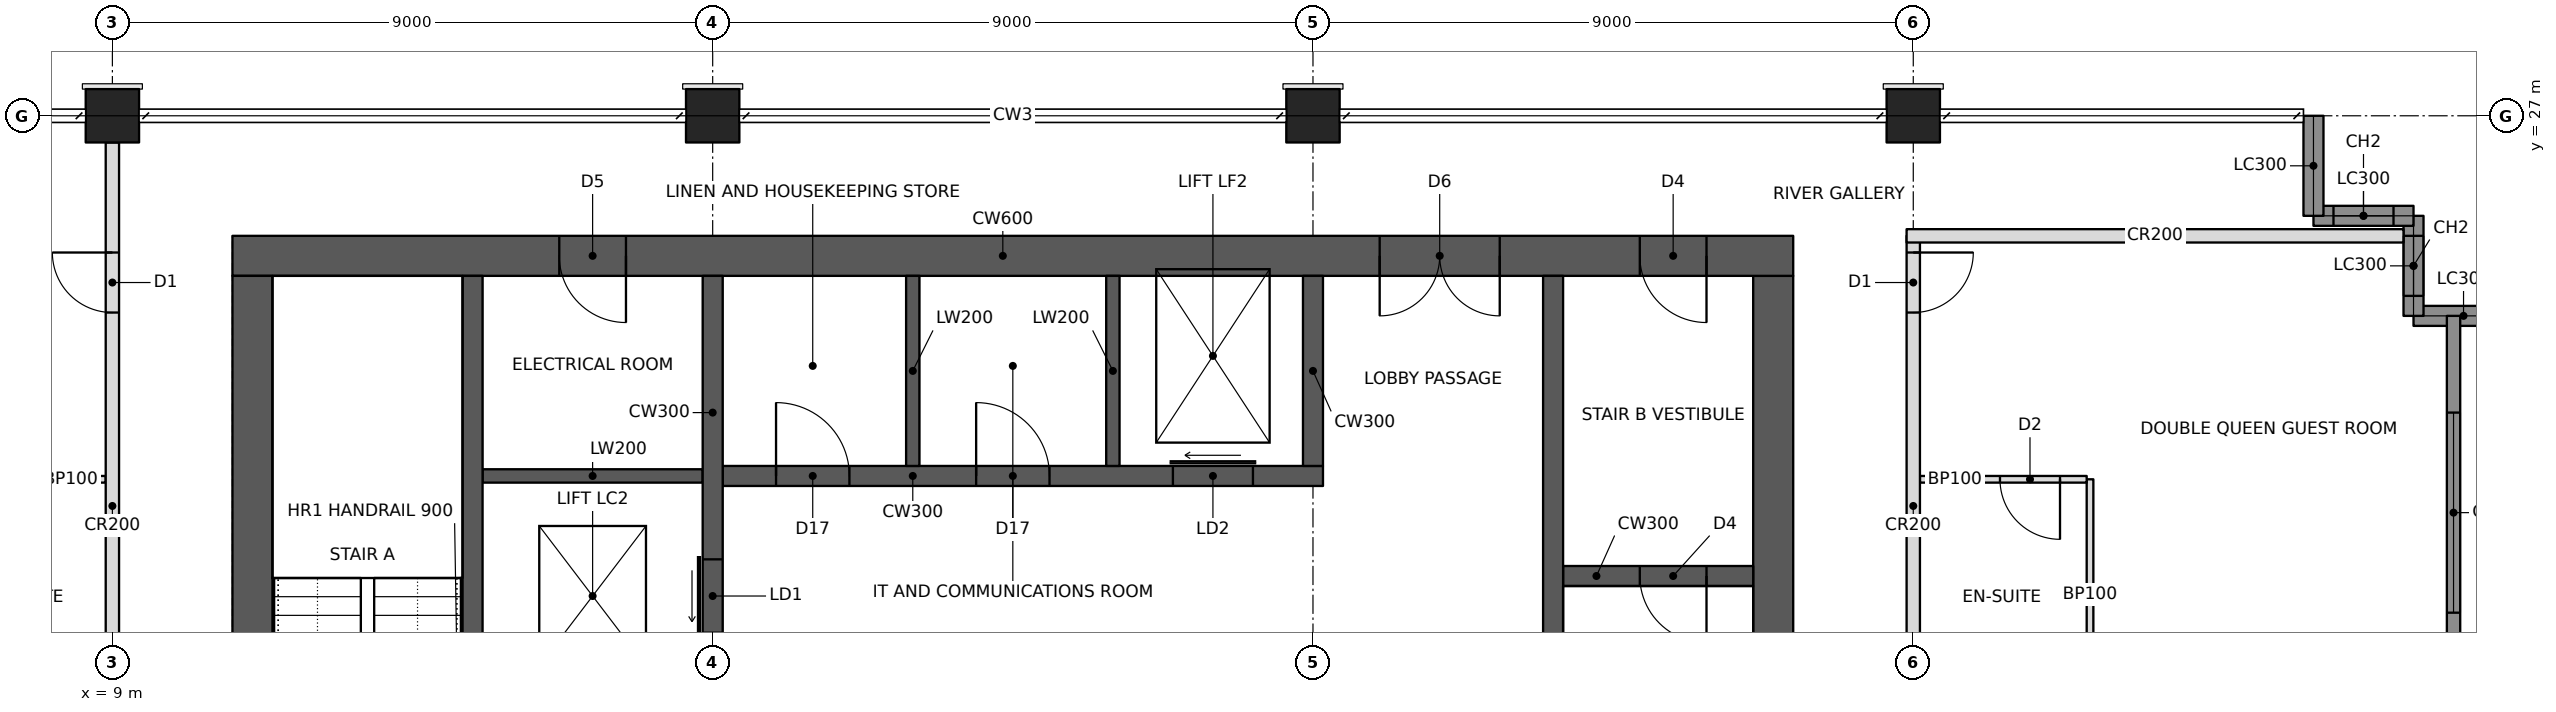
"""IFC4 building model, lengths in metres.
Left out: names, types, materials, properties, quantities, classifications, styles, units other than length and angle.
Written with IfcOpenShell. Run it as: python <this file> out.ifc"""

import sys

from ifc_helpers import new_model, si_unit, direction, frame, frame_2d, origin, origin_2d, place, context, subcontext, project, spatial, rectangle, hollow_rectangle, extrude, element, fill, save


model = new_model("IFC4")
c1 = context("Model", 3, precision=1e-05, world=origin(), true_north=direction((0.0, 1.0)))
c2 = subcontext(c1, "Body", "Model", "MODEL_VIEW")
j1 = project(units=[si_unit("LENGTHUNIT", "METRE"), si_unit("PLANEANGLEUNIT", "RADIAN")], contexts=[c1])
p1 = place(None, origin())
s1 = spatial("IfcSite", under=j1, at=p1, CompositionType="ELEMENT")
p2 = place(p1, origin())
s2 = spatial("IfcBuilding", under=s1, at=p2, CompositionType="ELEMENT")
p3 = place(p2, frame((0.0, 0.0, 167.2)))
s3 = spatial("IfcBuildingStorey", under=s2, at=p3, CompositionType="ELEMENT", Elevation=167.2)
for number, where, z_axis, x_axis in (
    (1, (9.0, 27.0, 0.0), (0.0, 0.0, 1.0), (1.0, 0.0, 0.0)),
    (2, (18.0, 27.0, 0.0), (0.0, 0.0, 1.0), (1.0, 0.0, 0.0)),
    (3, (27.0, 27.0, 0.0), (0.0, 0.0, 1.0), (1.0, 0.0, 0.0)),
    (4, (36.0, 27.0, 0.0), (0.0, 0.0, 1.0), (1.0, 0.0, 0.0)),
):
    element("IfcColumn", number, at=place(p3, frame(where, z_axis=z_axis, x_axis=x_axis)), inside=s3, PredefinedType="COLUMN", context=c2, shape_type="SweptSolid", body=[
        extrude(hollow_rectangle(XDim=0.8, YDim=0.8, WallThickness=0.07, at=origin_2d()), origin(), (0.0, 0.0, 1.0), 3.4),
    ])
p4 = place(p3, frame((10.8, 24.9, 0.0), z_axis=(0.0, 0.0, 1.0), x_axis=(1.0, 0.0, 0.0)))
e5 = element("IfcWall", 5, at=p4, inside=s3, PredefinedType="SHEAR", context=c2, shape_type="SweptSolid", body=[
    extrude(rectangle(XDim=23.4, YDim=0.6, at=frame_2d((11.7, 0.0))), origin(), (0.0, 0.0, 1.0), 3.4),
])
p5 = place(p4, frame((17.2, 0.0, 0.0)))
e6 = element("IfcOpeningElement", 6, at=p5, cuts=e5, PredefinedType="OPENING", context=c2, shape_type="SweptSolid", body=[
    extrude(rectangle(XDim=1.8, YDim=2.1, at=frame_2d((0.9, 1.05))), frame((0.0, 0.31, 0.0), z_axis=(0.0, -1.0, 0.0), x_axis=(1.0, 0.0, 0.0)), (0.0, 0.0, 1.0), 0.62),
])
p6 = place(p4, frame((21.1, 0.0, 0.0)))
e7 = element("IfcOpeningElement", 7, at=p6, cuts=e5, PredefinedType="OPENING", context=c2, shape_type="SweptSolid", body=[
    extrude(rectangle(XDim=1.0, YDim=2.1, at=frame_2d((0.5, 1.05))), frame((0.0, 0.31, 0.0), z_axis=(0.0, -1.0, 0.0), x_axis=(1.0, 0.0, 0.0)), (0.0, 0.0, 1.0), 0.62),
])
p7 = place(p4, frame((4.9, 0.0, 0.0)))
e8 = element("IfcOpeningElement", 8, at=p7, cuts=e5, PredefinedType="OPENING", context=c2, shape_type="SweptSolid", body=[
    extrude(rectangle(XDim=1.0, YDim=2.1, at=frame_2d((0.5, 1.05))), frame((0.0, 0.31, 0.0), z_axis=(0.0, -1.0, 0.0), x_axis=(1.0, 0.0, 0.0)), (0.0, 0.0, 1.0), 0.62),
])
for number, where, z_axis, x_axis in (
    (9, (11.1, 11.4, 0.0), (0.0, 0.0, 1.0), (0.0, 1.0, 0.0)),
    (10, (33.9, 11.4, 0.0), (0.0, 0.0, 1.0), (0.0, 1.0, 0.0)),
):
    element("IfcWall", number, at=place(p3, frame(where, z_axis=z_axis, x_axis=x_axis)), inside=s3, PredefinedType="SHEAR", context=c2, shape_type="SweptSolid", body=[
        extrude(rectangle(XDim=13.2, YDim=0.6, at=frame_2d((6.6, 0.0))), origin(), (0.0, 0.0, 1.0), 3.4),
    ])
p8 = place(p3, frame((14.4, 11.4, 0.0), z_axis=(0.0, 0.0, 1.0), x_axis=(0.0, 1.0, 0.0)))
e11 = element("IfcWall", 11, at=p8, inside=s3, PredefinedType="SHEAR", context=c2, shape_type="SweptSolid", body=[
    extrude(rectangle(XDim=13.2, YDim=0.3, at=frame_2d((6.6, 0.0))), origin(), (0.0, 0.0, 1.0), 3.4),
])
p9 = place(p3, frame((18.0, 11.4, 0.0), z_axis=(0.0, 0.0, 1.0), x_axis=(0.0, 1.0, 0.0)))
e12 = element("IfcWall", 12, at=p9, inside=s3, PredefinedType="SHEAR", context=c2, shape_type="SweptSolid", body=[
    extrude(rectangle(XDim=13.2, YDim=0.3, at=frame_2d((6.6, 0.0))), origin(), (0.0, 0.0, 1.0), 3.4),
])
p10 = place(p9, frame((3.6, 0.0, 0.0)))
e13 = element("IfcOpeningElement", 13, at=p10, cuts=e12, PredefinedType="OPENING", context=c2, shape_type="SweptSolid", body=[
    extrude(rectangle(XDim=1.0, YDim=2.1, at=frame_2d((0.5, 1.05))), frame((0.0, 0.16, 0.0), z_axis=(0.0, -1.0, 0.0), x_axis=(1.0, 0.0, 0.0)), (0.0, 0.0, 1.0), 0.32),
])
p11 = place(p9, frame((7.85, 0.0, 0.0)))
e14 = element("IfcOpeningElement", 14, at=p11, cuts=e12, PredefinedType="OPENING", context=c2, shape_type="SweptSolid", body=[
    extrude(rectangle(XDim=1.1, YDim=2.1, at=frame_2d((0.55, 1.05))), frame((0.0, 0.16, 0.0), z_axis=(0.0, -1.0, 0.0), x_axis=(1.0, 0.0, 0.0)), (0.0, 0.0, 1.0), 0.32),
])
p12 = place(p3, frame((18.15, 21.6, 0.0), z_axis=(0.0, 0.0, 1.0), x_axis=(1.0, 0.0, 0.0)))
e15 = element("IfcWall", 15, at=p12, inside=s3, PredefinedType="SHEAR", context=c2, shape_type="SweptSolid", body=[
    extrude(rectangle(XDim=9.0, YDim=0.3, at=frame_2d((4.5, 0.0))), origin(), (0.0, 0.0, 1.0), 3.4),
])
p13 = place(p12, frame((6.75, 0.0, 0.0)))
e16 = element("IfcOpeningElement", 16, at=p13, cuts=e15, PredefinedType="OPENING", context=c2, shape_type="SweptSolid", body=[
    extrude(rectangle(XDim=1.2, YDim=2.1, at=frame_2d((0.6, 1.05))), frame((0.0, 0.16, 0.0), z_axis=(0.0, -1.0, 0.0), x_axis=(1.0, 0.0, 0.0)), (0.0, 0.0, 1.0), 0.32),
])
p14 = place(p12, frame((0.8, 0.0, 0.0)))
e17 = element("IfcOpeningElement", 17, at=p14, cuts=e15, PredefinedType="OPENING", context=c2, shape_type="SweptSolid", body=[
    extrude(rectangle(XDim=1.1, YDim=2.1, at=frame_2d((0.55, 1.05))), frame((0.0, 0.16, 0.0), z_axis=(0.0, -1.0, 0.0), x_axis=(1.0, 0.0, 0.0)), (0.0, 0.0, 1.0), 0.32),
])
p15 = place(p12, frame((3.8, 0.0, 0.0)))
e18 = element("IfcOpeningElement", 18, at=p15, cuts=e15, PredefinedType="OPENING", context=c2, shape_type="SweptSolid", body=[
    extrude(rectangle(XDim=1.1, YDim=2.1, at=frame_2d((0.55, 1.05))), frame((0.0, 0.16, 0.0), z_axis=(0.0, -1.0, 0.0), x_axis=(1.0, 0.0, 0.0)), (0.0, 0.0, 1.0), 0.32),
])
p16 = place(p3, frame((27.0, 21.75, 0.0), z_axis=(0.0, 0.0, 1.0), x_axis=(0.0, 1.0, 0.0)))
e19 = element("IfcWall", 19, at=p16, inside=s3, PredefinedType="SHEAR", context=c2, shape_type="SweptSolid", body=[
    extrude(rectangle(XDim=2.85, YDim=0.3, at=frame_2d((1.425, 0.0))), origin(), (0.0, 0.0, 1.0), 3.4),
])
for number, where, z_axis, x_axis in (
    (20, (21.0, 21.75, 0.0), (0.0, 0.0, 1.0), (0.0, 1.0, 0.0)),
    (21, (24.0, 21.75, 0.0), (0.0, 0.0, 1.0), (0.0, 1.0, 0.0)),
):
    element("IfcWall", number, at=place(p3, frame(where, z_axis=z_axis, x_axis=x_axis)), inside=s3, PredefinedType="SHEAR", context=c2, shape_type="SweptSolid", body=[
        extrude(rectangle(XDim=2.85, YDim=0.2, at=frame_2d((1.425, 0.0))), origin(), (0.0, 0.0, 1.0), 3.4),
    ])
p17 = place(p3, frame((30.6, 11.4, 0.0), z_axis=(0.0, 0.0, 1.0), x_axis=(0.0, 1.0, 0.0)))
e22 = element("IfcWall", 22, at=p17, inside=s3, PredefinedType="SHEAR", context=c2, shape_type="SweptSolid", body=[
    extrude(rectangle(XDim=13.2, YDim=0.3, at=frame_2d((6.6, 0.0))), origin(), (0.0, 0.0, 1.0), 3.4),
])
p18 = place(p3, frame((30.75, 20.1, 0.0), z_axis=(0.0, 0.0, 1.0), x_axis=(1.0, 0.0, 0.0)))
e23 = element("IfcWall", 23, at=p18, inside=s3, PredefinedType="SHEAR", context=c2, shape_type="SweptSolid", body=[
    extrude(rectangle(XDim=2.85, YDim=0.3, at=frame_2d((1.425, 0.0))), origin(), (0.0, 0.0, 1.0), 3.4),
])
p19 = place(p18, frame((1.15, 0.0, 0.0)))
e24 = element("IfcOpeningElement", 24, at=p19, cuts=e23, PredefinedType="OPENING", context=c2, shape_type="SweptSolid", body=[
    extrude(rectangle(XDim=1.0, YDim=2.1, at=frame_2d((0.5, 1.05))), frame((0.0, 0.16, 0.0), z_axis=(0.0, -1.0, 0.0), x_axis=(1.0, 0.0, 0.0)), (0.0, 0.0, 1.0), 0.32),
])
p20 = place(p3, frame((14.55, 21.6, 0.0), z_axis=(0.0, 0.0, 1.0), x_axis=(1.0, 0.0, 0.0)))
e25 = element("IfcWall", 25, at=p20, inside=s3, PredefinedType="SHEAR", context=c2, shape_type="SweptSolid", body=[
    extrude(rectangle(XDim=3.3, YDim=0.2, at=frame_2d((1.65, 0.0))), origin(), (0.0, 0.0, 1.0), 3.4),
])
p21 = place(p3, frame((45.0, 24.0, 0.0), z_axis=(0.0, 0.0, 1.0), x_axis=(-1.0, 0.0, 0.0)))
e26 = element("IfcWall", 26, at=p21, inside=s3, PredefinedType="SOLIDWALL", context=c2, shape_type="SweptSolid", body=[
    extrude(rectangle(XDim=1.5, YDim=0.3, at=frame_2d((0.75, 0.0))), origin(), (0.0, 0.0, 1.0), 2.42),
])
p22 = place(p3, frame((43.5, 24.0, 0.0), z_axis=(0.0, 0.0, 1.0), x_axis=(0.0, 1.0, 0.0)))
e27 = element("IfcWall", 27, at=p22, inside=s3, PredefinedType="SOLIDWALL", context=c2, shape_type="SweptSolid", body=[
    extrude(rectangle(XDim=1.5, YDim=0.3, at=frame_2d((0.75, 0.0))), origin(), (0.0, 0.0, 1.0), 3.2),
])
p23 = place(p22, frame((0.3, 0.0, 0.6)))
e28 = element("IfcOpeningElement", 28, at=p23, cuts=e27, PredefinedType="OPENING", context=c2, shape_type="SweptSolid", body=[
    extrude(rectangle(XDim=0.9, YDim=2.2, at=frame_2d((0.45, 1.1))), frame((0.0, 0.16, 0.0), z_axis=(0.0, -1.0, 0.0), x_axis=(1.0, 0.0, 0.0)), (0.0, 0.0, 1.0), 0.32),
])
p24 = place(p3, frame((43.5, 25.5, 0.0), z_axis=(0.0, 0.0, 1.0), x_axis=(-1.0, 0.0, 0.0)))
e29 = element("IfcWall", 29, at=p24, inside=s3, PredefinedType="SOLIDWALL", context=c2, shape_type="SweptSolid", body=[
    extrude(rectangle(XDim=1.5, YDim=0.3, at=frame_2d((0.75, 0.0))), origin(), (0.0, 0.0, 1.0), 3.2),
])
p25 = place(p24, frame((0.3, 0.0, 0.6)))
e30 = element("IfcOpeningElement", 30, at=p25, cuts=e29, PredefinedType="OPENING", context=c2, shape_type="SweptSolid", body=[
    extrude(rectangle(XDim=0.9, YDim=2.2, at=frame_2d((0.45, 1.1))), frame((0.0, 0.16, 0.0), z_axis=(0.0, -1.0, 0.0), x_axis=(1.0, 0.0, 0.0)), (0.0, 0.0, 1.0), 0.32),
])
p26 = place(p3, frame((42.0, 25.5, 0.0), z_axis=(0.0, 0.0, 1.0), x_axis=(0.0, 1.0, 0.0)))
e31 = element("IfcWall", 31, at=p26, inside=s3, PredefinedType="SOLIDWALL", context=c2, shape_type="SweptSolid", body=[
    extrude(rectangle(XDim=1.5, YDim=0.3, at=frame_2d((0.75, 0.0))), origin(), (0.0, 0.0, 1.0), 2.42),
])
p27 = place(p3, frame((9.0, 18.4, 0.0), z_axis=(0.0, 0.0, 1.0), x_axis=(0.0, 1.0, 0.0)))
e32 = element("IfcWall", 32, at=p27, inside=s3, PredefinedType="PARTITIONING", context=c2, shape_type="SweptSolid", body=[
    extrude(rectangle(XDim=8.2, YDim=0.2, at=frame_2d((4.1, 0.0))), origin(), (0.0, 0.0, 1.0), 2.405),
])
p28 = place(p27, frame((5.65, 0.0, 0.0)))
e33 = element("IfcOpeningElement", 33, at=p28, cuts=e32, PredefinedType="OPENING", context=c2, shape_type="SweptSolid", body=[
    extrude(rectangle(XDim=0.9, YDim=2.1, at=frame_2d((0.45, 1.05))), frame((0.0, 0.11, 0.0), z_axis=(0.0, -1.0, 0.0), x_axis=(1.0, 0.0, 0.0)), (0.0, 0.0, 1.0), 0.22),
])
p29 = place(p3, frame((36.0, 18.4, 0.0), z_axis=(0.0, 0.0, 1.0), x_axis=(0.0, 1.0, 0.0)))
e34 = element("IfcWall", 34, at=p29, inside=s3, PredefinedType="PARTITIONING", context=c2, shape_type="SweptSolid", body=[
    extrude(rectangle(XDim=6.8, YDim=0.2, at=frame_2d((3.4, 0.0))), origin(), (0.0, 0.0, 1.0), 2.405),
])
p30 = place(p29, frame((5.65, 0.0, 0.0)))
e35 = element("IfcOpeningElement", 35, at=p30, cuts=e34, PredefinedType="OPENING", context=c2, shape_type="SweptSolid", body=[
    extrude(rectangle(XDim=0.9, YDim=2.1, at=frame_2d((0.45, 1.05))), frame((0.0, 0.11, 0.0), z_axis=(0.0, -1.0, 0.0), x_axis=(1.0, 0.0, 0.0)), (0.0, 0.0, 1.0), 0.22),
])
p31 = place(p3, frame((35.9, 25.2, 0.0), z_axis=(0.0, 0.0, 1.0), x_axis=(1.0, 0.0, 0.0)))
e36 = element("IfcWall", 36, at=p31, inside=s3, PredefinedType="PARTITIONING", context=c2, shape_type="SweptSolid", body=[
    extrude(rectangle(XDim=7.45, YDim=0.2, at=frame_2d((3.725, 0.0))), origin(), (0.0, 0.0, 1.0), 2.404),
])
p32 = place(p3, frame((8.9, 21.55, 0.0), z_axis=(0.0, 0.0, 1.0), x_axis=(-1.0, 0.0, 0.0)))
e37 = element("IfcWall", 37, at=p32, inside=s3, PredefinedType="PARTITIONING", context=c2, shape_type="SweptSolid", body=[
    extrude(rectangle(XDim=2.5, YDim=0.1, at=frame_2d((1.25, 0.0))), origin(), (0.0, 0.0, 1.0), 2.404),
])
p33 = place(p32, frame((1.2, 0.0, 0.0)))
e38 = element("IfcOpeningElement", 38, at=p33, cuts=e37, PredefinedType="OPENING", context=c2, shape_type="SweptSolid", body=[
    extrude(rectangle(XDim=0.9, YDim=2.1, at=frame_2d((0.45, 1.05))), frame((0.0, 0.06, 0.0), z_axis=(0.0, -1.0, 0.0), x_axis=(1.0, 0.0, 0.0)), (0.0, 0.0, 1.0), 0.12),
])
p34 = place(p3, frame((38.65, 18.1, 0.0), z_axis=(0.0, 0.0, 1.0), x_axis=(0.0, 1.0, 0.0)))
e39 = element("IfcWall", 39, at=p34, inside=s3, PredefinedType="PARTITIONING", context=c2, shape_type="SweptSolid", body=[
    extrude(rectangle(XDim=3.45, YDim=0.1, at=frame_2d((1.725, 0.0))), origin(), (0.0, 0.0, 1.0), 2.404),
])
p35 = place(p3, frame((36.1, 21.55, 0.0), z_axis=(0.0, 0.0, 1.0), x_axis=(1.0, 0.0, 0.0)))
e40 = element("IfcWall", 40, at=p35, inside=s3, PredefinedType="PARTITIONING", context=c2, shape_type="SweptSolid", body=[
    extrude(rectangle(XDim=2.5, YDim=0.1, at=frame_2d((1.25, 0.0))), origin(), (0.0, 0.0, 1.0), 2.404),
])
p36 = place(p35, frame((1.2, 0.0, 0.0)))
e41 = element("IfcOpeningElement", 41, at=p36, cuts=e40, PredefinedType="OPENING", context=c2, shape_type="SweptSolid", body=[
    extrude(rectangle(XDim=0.9, YDim=2.1, at=frame_2d((0.45, 1.05))), frame((0.0, 0.06, 0.0), z_axis=(0.0, -1.0, 0.0), x_axis=(1.0, 0.0, 0.0)), (0.0, 0.0, 1.0), 0.12),
])
p37 = place(p3, frame((44.1, 18.194, 0.0), z_axis=(0.0, 0.0, 1.0), x_axis=(0.0, 1.0, 0.0)))
e42 = element("IfcWall", 42, at=p37, inside=s3, PredefinedType="SOLIDWALL", context=c2, shape_type="SweptSolid", body=[
    extrude(rectangle(XDim=5.806, YDim=0.2, at=frame_2d((2.903, 0.0))), origin(), (0.0, 0.0, 1.0), 3.2),
])
p38 = place(p37, frame((1.356, 0.0, 0.6)))
e43 = element("IfcOpeningElement", 43, at=p38, cuts=e42, PredefinedType="OPENING", context=c2, shape_type="SweptSolid", body=[
    extrude(rectangle(XDim=3.0, YDim=2.2, at=frame_2d((1.5, 1.1))), frame((0.0, 0.11, 0.0), z_axis=(0.0, -1.0, 0.0), x_axis=(1.0, 0.0, 0.0)), (0.0, 0.0, 1.0), 0.22),
])
p39 = place(p23, origin())
e44 = element("IfcWindow", 44, at=p39, inside=s3, PartitioningType="SINGLE_PANEL", PredefinedType="WINDOW", context=c2, shape_type="SweptSolid", body=[
    extrude(rectangle(XDim=0.9, YDim=2.2, at=frame_2d((0.45, 1.1))), frame((0.0, 0.03, 0.0), z_axis=(0.0, -1.0, 0.0), x_axis=(1.0, 0.0, 0.0)), (0.0, 0.0, 1.0), 0.06),
])
fill(e28, e44)
p40 = place(p25, origin())
e45 = element("IfcWindow", 45, at=p40, inside=s3, PartitioningType="SINGLE_PANEL", PredefinedType="WINDOW", context=c2, shape_type="SweptSolid", body=[
    extrude(rectangle(XDim=0.9, YDim=2.2, at=frame_2d((0.45, 1.1))), frame((0.0, 0.03, 0.0), z_axis=(0.0, -1.0, 0.0), x_axis=(1.0, 0.0, 0.0)), (0.0, 0.0, 1.0), 0.06),
])
fill(e30, e45)
p41 = place(p38, origin())
e46 = element("IfcWindow", 46, at=p41, inside=s3, PartitioningType="TRIPLE_PANEL_VERTICAL", PredefinedType="WINDOW", context=c2, shape_type="SweptSolid", body=[
    extrude(rectangle(XDim=3.0, YDim=2.2, at=frame_2d((1.5, 1.1))), frame((0.0, 0.03, 0.0), z_axis=(0.0, -1.0, 0.0), x_axis=(1.0, 0.0, 0.0)), (0.0, 0.0, 1.0), 0.06),
])
fill(e43, e46)
p42 = place(p28, origin())
e47 = element("IfcDoor", 47, at=p42, inside=s3, OperationType="SINGLE_SWING_RIGHT", PredefinedType="DOOR", context=c2, shape_type="SweptSolid", body=[
    extrude(rectangle(XDim=0.9, YDim=2.1, at=frame_2d((0.45, 1.05))), frame((0.0, 0.025, 0.0), z_axis=(0.0, -1.0, 0.0), x_axis=(1.0, 0.0, 0.0)), (0.0, 0.0, 1.0), 0.05),
])
fill(e33, e47)
p43 = place(p36, frame((0.9, 0.0, 0.0), z_axis=(0.0, 0.0, 1.0), x_axis=(-1.0, 0.0, 0.0)))
e48 = element("IfcDoor", 48, at=p43, inside=s3, OperationType="SINGLE_SWING_LEFT", PredefinedType="DOOR", context=c2, shape_type="SweptSolid", body=[
    extrude(rectangle(XDim=0.9, YDim=2.1, at=frame_2d((0.45, 1.05))), frame((0.0, 0.025, 0.0), z_axis=(0.0, -1.0, 0.0), x_axis=(1.0, 0.0, 0.0)), (0.0, 0.0, 1.0), 0.05),
])
fill(e41, e48)
p44 = place(p30, frame((0.9, 0.0, 0.0), z_axis=(0.0, 0.0, 1.0), x_axis=(-1.0, 0.0, 0.0)))
e49 = element("IfcDoor", 49, at=p44, inside=s3, OperationType="SINGLE_SWING_LEFT", PredefinedType="DOOR", context=c2, shape_type="SweptSolid", body=[
    extrude(rectangle(XDim=0.9, YDim=2.1, at=frame_2d((0.45, 1.05))), frame((0.0, 0.025, 0.0), z_axis=(0.0, -1.0, 0.0), x_axis=(1.0, 0.0, 0.0)), (0.0, 0.0, 1.0), 0.05),
])
fill(e35, e49)
p45 = place(p5, frame((1.8, 0.0, 0.0), z_axis=(0.0, 0.0, 1.0), x_axis=(-1.0, 0.0, 0.0)))
e50 = element("IfcDoor", 50, at=p45, inside=s3, OperationType="DOUBLE_DOOR_SINGLE_SWING", PredefinedType="DOOR", context=c2, shape_type="SweptSolid", body=[
    extrude(rectangle(XDim=1.8, YDim=2.1, at=frame_2d((0.9, 1.05))), frame((0.0, 0.025, 0.0), z_axis=(0.0, -1.0, 0.0), x_axis=(1.0, 0.0, 0.0)), (0.0, 0.0, 1.0), 0.05),
])
fill(e6, e50)
p46 = place(p6, frame((1.0, 0.0, 0.0), z_axis=(0.0, 0.0, 1.0), x_axis=(-1.0, 0.0, 0.0)))
e51 = element("IfcDoor", 51, at=p46, inside=s3, OperationType="SINGLE_SWING_LEFT", PredefinedType="DOOR", context=c2, shape_type="SweptSolid", body=[
    extrude(rectangle(XDim=1.0, YDim=2.1, at=frame_2d((0.5, 1.05))), frame((0.0, 0.025, 0.0), z_axis=(0.0, -1.0, 0.0), x_axis=(1.0, 0.0, 0.0)), (0.0, 0.0, 1.0), 0.05),
])
fill(e7, e51)
p47 = place(p19, frame((1.0, 0.0, 0.0), z_axis=(0.0, 0.0, 1.0), x_axis=(-1.0, 0.0, 0.0)))
e52 = element("IfcDoor", 52, at=p47, inside=s3, OperationType="SINGLE_SWING_LEFT", PredefinedType="DOOR", context=c2, shape_type="SweptSolid", body=[
    extrude(rectangle(XDim=1.0, YDim=2.1, at=frame_2d((0.5, 1.05))), frame((0.0, 0.025, 0.0), z_axis=(0.0, -1.0, 0.0), x_axis=(1.0, 0.0, 0.0)), (0.0, 0.0, 1.0), 0.05),
])
fill(e24, e52)
p48 = place(p7, frame((1.0, 0.0, 0.0), z_axis=(0.0, 0.0, 1.0), x_axis=(-1.0, 0.0, 0.0)))
e53 = element("IfcDoor", 53, at=p48, inside=s3, OperationType="SINGLE_SWING_LEFT", PredefinedType="DOOR", context=c2, shape_type="SweptSolid", body=[
    extrude(rectangle(XDim=1.0, YDim=2.1, at=frame_2d((0.5, 1.05))), frame((0.0, 0.025, 0.0), z_axis=(0.0, -1.0, 0.0), x_axis=(1.0, 0.0, 0.0)), (0.0, 0.0, 1.0), 0.05),
])
fill(e8, e53)
p49 = place(p11, origin())
e54 = element("IfcDoor", 54, at=p49, inside=s3, OperationType="SLIDING_TO_LEFT", PredefinedType="DOOR", context=c2, shape_type="SweptSolid", body=[
    extrude(rectangle(XDim=1.1, YDim=2.1, at=frame_2d((0.55, 1.05))), frame((0.0, 0.025, 0.0), z_axis=(0.0, -1.0, 0.0), x_axis=(1.0, 0.0, 0.0)), (0.0, 0.0, 1.0), 0.05),
])
fill(e14, e54)
p50 = place(p13, origin())
e55 = element("IfcDoor", 55, at=p50, inside=s3, OperationType="SLIDING_TO_LEFT", PredefinedType="DOOR", context=c2, shape_type="SweptSolid", body=[
    extrude(rectangle(XDim=1.2, YDim=2.1, at=frame_2d((0.6, 1.05))), frame((0.0, 0.025, 0.0), z_axis=(0.0, -1.0, 0.0), x_axis=(1.0, 0.0, 0.0)), (0.0, 0.0, 1.0), 0.05),
])
fill(e16, e55)
p51 = place(p14, origin())
e56 = element("IfcDoor", 56, at=p51, inside=s3, OperationType="SINGLE_SWING_LEFT", PredefinedType="DOOR", context=c2, shape_type="SweptSolid", body=[
    extrude(rectangle(XDim=1.1, YDim=2.1, at=frame_2d((0.55, 1.05))), frame((0.0, 0.025, 0.0), z_axis=(0.0, -1.0, 0.0), x_axis=(1.0, 0.0, 0.0)), (0.0, 0.0, 1.0), 0.05),
])
fill(e17, e56)
p52 = place(p15, origin())
e57 = element("IfcDoor", 57, at=p52, inside=s3, OperationType="SINGLE_SWING_LEFT", PredefinedType="DOOR", context=c2, shape_type="SweptSolid", body=[
    extrude(rectangle(XDim=1.1, YDim=2.1, at=frame_2d((0.55, 1.05))), frame((0.0, 0.025, 0.0), z_axis=(0.0, -1.0, 0.0), x_axis=(1.0, 0.0, 0.0)), (0.0, 0.0, 1.0), 0.05),
])
fill(e18, e57)
save(model, sys.argv[1])
